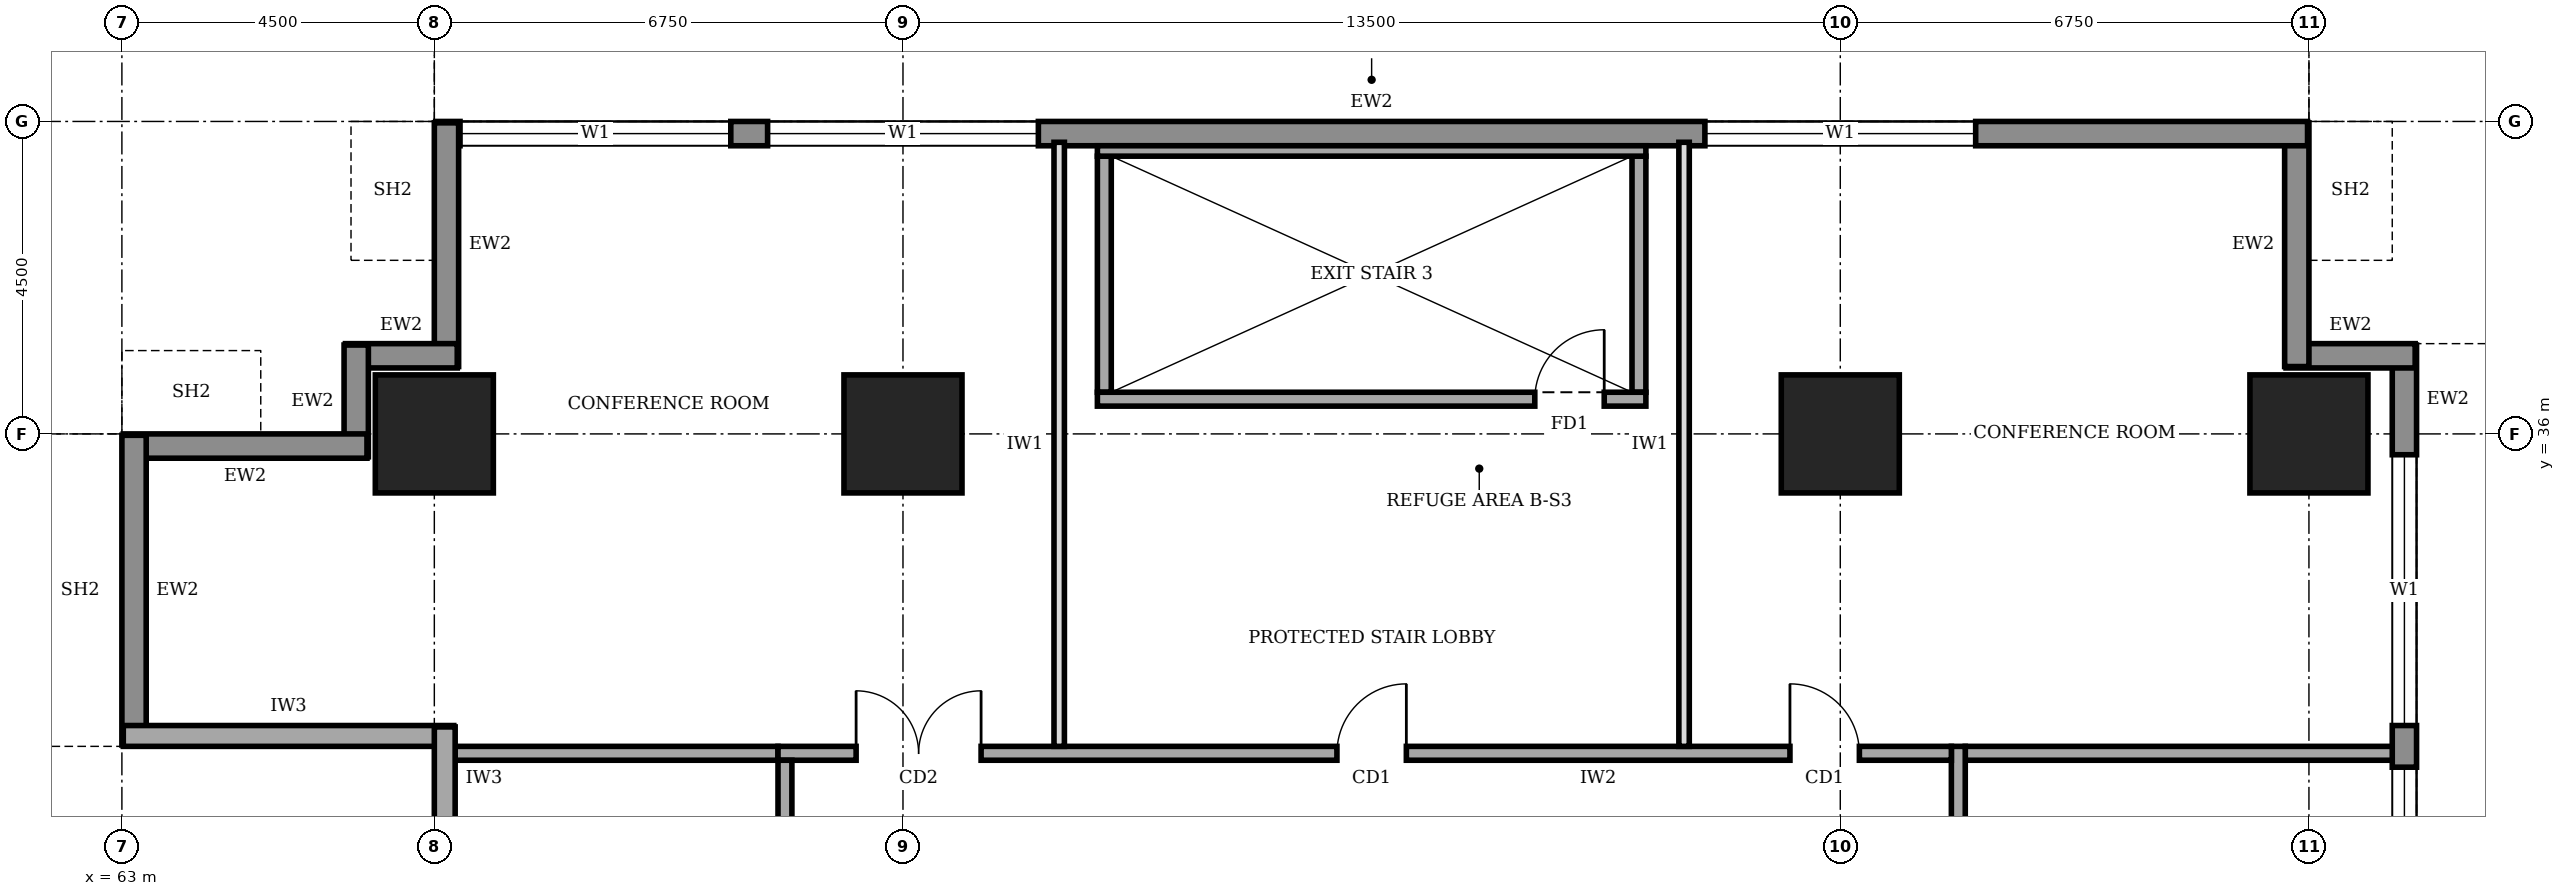
"""IFC4 building model, lengths in metres.
Left out: names, types, materials, properties, quantities, classifications, styles, units other than length and angle.
Written with IfcOpenShell. Run it as: python <this file> out.ifc"""

import sys

from ifc_helpers import new_model, si_unit, direction, frame, frame_2d, origin, origin_2d, place, context, subcontext, project, spatial, rectangle, extrude, element, fill, save


model = new_model("IFC4")
c1 = context("Model", 3, precision=1e-05, world=origin(), true_north=direction((0.0, 1.0)))
c2 = subcontext(c1, "Body", "Model", "MODEL_VIEW")
j1 = project(units=[si_unit("LENGTHUNIT", "METRE"), si_unit("PLANEANGLEUNIT", "RADIAN")], contexts=[c1])
p1 = place(None, origin())
s1 = spatial("IfcSite", under=j1, at=p1, CompositionType="ELEMENT")
p2 = place(p1, origin())
s2 = spatial("IfcBuilding", under=s1, at=p2, CompositionType="ELEMENT")
p3 = place(p2, frame((0.0, 0.0, 133.0)))
s3 = spatial("IfcBuildingStorey", under=s2, at=p3, CompositionType="ELEMENT", Elevation=133.0)
for number, where, z_axis, x_axis in (
    (1, (67.5, 36.0, 0.0), (0.0, 0.0, 1.0), (1.0, 0.0, 0.0)),
    (2, (74.25, 36.0, 0.0), (0.0, 0.0, 1.0), (1.0, 0.0, 0.0)),
    (3, (87.75, 36.0, 0.0), (0.0, 0.0, 1.0), (1.0, 0.0, 0.0)),
    (4, (94.5, 36.0, 0.0), (0.0, 0.0, 1.0), (1.0, 0.0, 0.0)),
):
    element("IfcColumn", number, at=place(p3, frame(where, z_axis=z_axis, x_axis=x_axis)), inside=s3, PredefinedType="COLUMN", context=c2, shape_type="SweptSolid", body=[
        extrude(rectangle(XDim=1.7, YDim=1.7, at=origin_2d()), origin(), (0.0, 0.0, 1.0), 4.0),
    ])
p4 = place(p3, frame((95.875, 3.32, 0.0), z_axis=(0.0, 0.0, 1.0), x_axis=(0.0, 1.0, 0.0)))
e5 = element("IfcWall", 5, at=p4, inside=s3, PredefinedType="STANDARD", context=c2, shape_type="SweptSolid", body=[
    extrude(rectangle(XDim=33.96, YDim=0.35, at=frame_2d((16.98, 0.0))), origin(), (0.0, 0.0, 1.0), 3.75),
])
p5 = place(p4, frame((1.48, 0.0, 0.9)))
e6 = element("IfcOpeningElement", 6, at=p5, cuts=e5, PredefinedType="OPENING", context=c2, shape_type="SweptSolid", body=[
    extrude(rectangle(XDim=3.9, YDim=2.2, at=frame_2d((1.95, 1.1))), frame((0.0, 0.185, 0.0), z_axis=(0.0, -1.0, 0.0), x_axis=(1.0, 0.0, 0.0)), (0.0, 0.0, 1.0), 0.37),
])
p6 = place(p4, frame((5.98, 0.0, 0.9)))
e7 = element("IfcOpeningElement", 7, at=p6, cuts=e5, PredefinedType="OPENING", context=c2, shape_type="SweptSolid", body=[
    extrude(rectangle(XDim=3.9, YDim=2.2, at=frame_2d((1.95, 1.1))), frame((0.0, 0.185, 0.0), z_axis=(0.0, -1.0, 0.0), x_axis=(1.0, 0.0, 0.0)), (0.0, 0.0, 1.0), 0.37),
])
p7 = place(p4, frame((10.48, 0.0, 0.9)))
e8 = element("IfcOpeningElement", 8, at=p7, cuts=e5, PredefinedType="OPENING", context=c2, shape_type="SweptSolid", body=[
    extrude(rectangle(XDim=3.9, YDim=2.2, at=frame_2d((1.95, 1.1))), frame((0.0, 0.185, 0.0), z_axis=(0.0, -1.0, 0.0), x_axis=(1.0, 0.0, 0.0)), (0.0, 0.0, 1.0), 0.37),
])
p8 = place(p4, frame((14.98, 0.0, 0.9)))
e9 = element("IfcOpeningElement", 9, at=p8, cuts=e5, PredefinedType="OPENING", context=c2, shape_type="SweptSolid", body=[
    extrude(rectangle(XDim=3.9, YDim=2.2, at=frame_2d((1.95, 1.1))), frame((0.0, 0.185, 0.0), z_axis=(0.0, -1.0, 0.0), x_axis=(1.0, 0.0, 0.0)), (0.0, 0.0, 1.0), 0.37),
])
p9 = place(p4, frame((19.48, 0.0, 0.9)))
e10 = element("IfcOpeningElement", 10, at=p9, cuts=e5, PredefinedType="OPENING", context=c2, shape_type="SweptSolid", body=[
    extrude(rectangle(XDim=3.9, YDim=2.2, at=frame_2d((1.95, 1.1))), frame((0.0, 0.185, 0.0), z_axis=(0.0, -1.0, 0.0), x_axis=(1.0, 0.0, 0.0)), (0.0, 0.0, 1.0), 0.37),
])
p10 = place(p4, frame((23.98, 0.0, 0.9)))
e11 = element("IfcOpeningElement", 11, at=p10, cuts=e5, PredefinedType="OPENING", context=c2, shape_type="SweptSolid", body=[
    extrude(rectangle(XDim=3.9, YDim=2.2, at=frame_2d((1.95, 1.1))), frame((0.0, 0.185, 0.0), z_axis=(0.0, -1.0, 0.0), x_axis=(1.0, 0.0, 0.0)), (0.0, 0.0, 1.0), 0.37),
])
p11 = place(p4, frame((28.48, 0.0, 0.9)))
e12 = element("IfcOpeningElement", 12, at=p11, cuts=e5, PredefinedType="OPENING", context=c2, shape_type="SweptSolid", body=[
    extrude(rectangle(XDim=3.9, YDim=2.2, at=frame_2d((1.95, 1.1))), frame((0.0, 0.185, 0.0), z_axis=(0.0, -1.0, 0.0), x_axis=(1.0, 0.0, 0.0)), (0.0, 0.0, 1.0), 0.37),
])
p12 = place(p3, frame((96.03, 37.125, 0.0), z_axis=(0.0, 0.0, 1.0), x_axis=(-1.0, 0.0, 0.0)))
e13 = element("IfcWall", 13, at=p12, inside=s3, PredefinedType="STANDARD", context=c2, shape_type="SweptSolid", body=[
    extrude(rectangle(XDim=1.86, YDim=0.35, at=frame_2d((0.93, 0.0))), origin(), (0.0, 0.0, 1.0), 3.75),
])
p13 = place(p3, frame((94.325, 36.97, 0.0), z_axis=(0.0, 0.0, 1.0), x_axis=(0.0, 1.0, 0.0)))
e14 = element("IfcWall", 14, at=p13, inside=s3, PredefinedType="STANDARD", context=c2, shape_type="SweptSolid", body=[
    extrude(rectangle(XDim=3.51, YDim=0.35, at=frame_2d((1.755, 0.0))), origin(), (0.0, 0.0, 1.0), 2.85),
])
p14 = place(p3, frame((94.48, 40.325, 0.0), z_axis=(0.0, 0.0, 1.0), x_axis=(-1.0, 0.0, 0.0)))
e15 = element("IfcWall", 15, at=p14, inside=s3, PredefinedType="STANDARD", context=c2, shape_type="SweptSolid", body=[
    extrude(rectangle(XDim=26.96, YDim=0.35, at=frame_2d((13.48, 0.0))), origin(), (0.0, 0.0, 1.0), 3.75),
])
p15 = place(p14, frame((22.71, 0.0, 0.9)))
e16 = element("IfcOpeningElement", 16, at=p15, cuts=e15, PredefinedType="OPENING", context=c2, shape_type="SweptSolid", body=[
    extrude(rectangle(XDim=3.9, YDim=2.2, at=frame_2d((1.95, 1.1))), frame((0.0, 0.185, 0.0), z_axis=(0.0, -1.0, 0.0), x_axis=(1.0, 0.0, 0.0)), (0.0, 0.0, 1.0), 0.37),
])
p16 = place(p14, frame((18.28, 0.0, 0.9)))
e17 = element("IfcOpeningElement", 17, at=p16, cuts=e15, PredefinedType="OPENING", context=c2, shape_type="SweptSolid", body=[
    extrude(rectangle(XDim=3.9, YDim=2.2, at=frame_2d((1.95, 1.1))), frame((0.0, 0.185, 0.0), z_axis=(0.0, -1.0, 0.0), x_axis=(1.0, 0.0, 0.0)), (0.0, 0.0, 1.0), 0.37),
])
p17 = place(p14, frame((4.78, 0.0, 0.9)))
e18 = element("IfcOpeningElement", 18, at=p17, cuts=e15, PredefinedType="OPENING", context=c2, shape_type="SweptSolid", body=[
    extrude(rectangle(XDim=3.9, YDim=2.2, at=frame_2d((1.95, 1.1))), frame((0.0, 0.185, 0.0), z_axis=(0.0, -1.0, 0.0), x_axis=(1.0, 0.0, 0.0)), (0.0, 0.0, 1.0), 0.37),
])
p18 = place(p3, frame((67.675, 40.48, 0.0), z_axis=(0.0, 0.0, 1.0), x_axis=(0.0, -1.0, 0.0)))
e19 = element("IfcWall", 19, at=p18, inside=s3, PredefinedType="STANDARD", context=c2, shape_type="SweptSolid", body=[
    extrude(rectangle(XDim=3.51, YDim=0.35, at=frame_2d((1.755, 0.0))), origin(), (0.0, 0.0, 1.0), 2.85),
])
for number, where, z_axis, x_axis in (
    (20, (67.83, 37.125, 0.0), (0.0, 0.0, 1.0), (-1.0, 0.0, 0.0)),
    (21, (66.375, 37.28, 0.0), (0.0, 0.0, 1.0), (0.0, -1.0, 0.0)),
):
    element("IfcWall", number, at=place(p3, frame(where, z_axis=z_axis, x_axis=x_axis)), inside=s3, PredefinedType="STANDARD", context=c2, shape_type="SweptSolid", body=[
        extrude(rectangle(XDim=1.61, YDim=0.35, at=frame_2d((0.805, 0.0))), origin(), (0.0, 0.0, 1.0), 3.75),
    ])
p19 = place(p3, frame((66.53, 35.825, 0.0), z_axis=(0.0, 0.0, 1.0), x_axis=(-1.0, 0.0, 0.0)))
e22 = element("IfcWall", 22, at=p19, inside=s3, PredefinedType="STANDARD", context=c2, shape_type="SweptSolid", body=[
    extrude(rectangle(XDim=3.51, YDim=0.35, at=frame_2d((1.755, 0.0))), origin(), (0.0, 0.0, 1.0), 2.85),
])
p20 = place(p3, frame((63.175, 35.98, 0.0), z_axis=(0.0, 0.0, 1.0), x_axis=(0.0, -1.0, 0.0)))
e23 = element("IfcWall", 23, at=p20, inside=s3, PredefinedType="STANDARD", context=c2, shape_type="SweptSolid", body=[
    extrude(rectangle(XDim=4.46, YDim=0.35, at=frame_2d((2.23, 0.0))), origin(), (0.0, 0.0, 1.0), 3.75),
])
p21 = place(p3, frame((63.02, 31.65, 0.0), z_axis=(0.0, 0.0, 1.0), x_axis=(1.0, 0.0, 0.0)))
e24 = element("IfcWall", 24, at=p21, inside=s3, PredefinedType="SOLIDWALL", context=c2, shape_type="SweptSolid", body=[
    extrude(rectangle(XDim=4.76, YDim=0.3, at=frame_2d((2.38, 0.0))), origin(), (0.0, 0.0, 1.0), 3.75),
])
p22 = place(p3, frame((67.65, 31.78, 0.0), z_axis=(0.0, 0.0, 1.0), x_axis=(0.0, -1.0, 0.0)))
e25 = element("IfcWall", 25, at=p22, inside=s3, PredefinedType="SOLIDWALL", context=c2, shape_type="SweptSolid", body=[
    extrude(rectangle(XDim=1.48, YDim=0.3, at=frame_2d((0.74, 0.0))), origin(), (0.0, 0.0, 1.0), 2.65),
])
p23 = place(p3, frame((89.45, 9.2, 0.0), z_axis=(0.0, 0.0, 1.0), x_axis=(0.0, 1.0, 0.0)))
e26 = element("IfcWall", 26, at=p23, inside=s3, PredefinedType="SOLIDWALL", context=c2, shape_type="SweptSolid", body=[
    extrude(rectangle(XDim=22.3, YDim=0.2, at=frame_2d((11.15, 0.0))), origin(), (0.0, 0.0, 1.0), 3.75),
])
p24 = place(p23, frame((1.625, 0.0, 0.0)))
e27 = element("IfcOpeningElement", 27, at=p24, cuts=e26, PredefinedType="OPENING", context=c2, shape_type="SweptSolid", body=[
    extrude(rectangle(XDim=1.0, YDim=2.1, at=frame_2d((0.5, 1.05))), frame((0.0, 0.11, 0.0), z_axis=(0.0, -1.0, 0.0), x_axis=(1.0, 0.0, 0.0)), (0.0, 0.0, 1.0), 0.22),
])
p25 = place(p23, frame((5.2, 0.0, 0.0)))
e28 = element("IfcOpeningElement", 28, at=p25, cuts=e26, PredefinedType="OPENING", context=c2, shape_type="SweptSolid", body=[
    extrude(rectangle(XDim=0.9, YDim=2.1, at=frame_2d((0.45, 1.05))), frame((0.0, 0.11, 0.0), z_axis=(0.0, -1.0, 0.0), x_axis=(1.0, 0.0, 0.0)), (0.0, 0.0, 1.0), 0.22),
])
p26 = place(p23, frame((8.325, 0.0, 0.0)))
e29 = element("IfcOpeningElement", 29, at=p26, cuts=e26, PredefinedType="OPENING", context=c2, shape_type="SweptSolid", body=[
    extrude(rectangle(XDim=0.9, YDim=2.1, at=frame_2d((0.45, 1.05))), frame((0.0, 0.11, 0.0), z_axis=(0.0, -1.0, 0.0), x_axis=(1.0, 0.0, 0.0)), (0.0, 0.0, 1.0), 0.22),
])
p27 = place(p23, frame((13.725, 0.0, 0.0)))
e30 = element("IfcOpeningElement", 30, at=p27, cuts=e26, PredefinedType="OPENING", context=c2, shape_type="SweptSolid", body=[
    extrude(rectangle(XDim=0.9, YDim=2.1, at=frame_2d((0.45, 1.05))), frame((0.0, 0.11, 0.0), z_axis=(0.0, -1.0, 0.0), x_axis=(1.0, 0.0, 0.0)), (0.0, 0.0, 1.0), 0.22),
])
p28 = place(p23, frame((16.15, 0.0, 0.0)))
e31 = element("IfcOpeningElement", 31, at=p28, cuts=e26, PredefinedType="OPENING", context=c2, shape_type="SweptSolid", body=[
    extrude(rectangle(XDim=1.0, YDim=2.1, at=frame_2d((0.5, 1.05))), frame((0.0, 0.11, 0.0), z_axis=(0.0, -1.0, 0.0), x_axis=(1.0, 0.0, 0.0)), (0.0, 0.0, 1.0), 0.22),
])
p29 = place(p23, frame((11.2, 0.0, 0.0)))
e32 = element("IfcOpeningElement", 32, at=p29, cuts=e26, PredefinedType="OPENING", context=c2, shape_type="SweptSolid", body=[
    extrude(rectangle(XDim=1.0, YDim=2.1, at=frame_2d((0.5, 1.05))), frame((0.0, 0.11, 0.0), z_axis=(0.0, -1.0, 0.0), x_axis=(1.0, 0.0, 0.0)), (0.0, 0.0, 1.0), 0.22),
])
p30 = place(p23, frame((19.475, 0.0, 0.0)))
e33 = element("IfcOpeningElement", 33, at=p30, cuts=e26, PredefinedType="OPENING", context=c2, shape_type="SweptSolid", body=[
    extrude(rectangle(XDim=1.0, YDim=2.1, at=frame_2d((0.5, 1.05))), frame((0.0, 0.11, 0.0), z_axis=(0.0, -1.0, 0.0), x_axis=(1.0, 0.0, 0.0)), (0.0, 0.0, 1.0), 0.22),
])
p31 = place(p3, frame((89.35, 31.4, 0.0), z_axis=(0.0, 0.0, 1.0), x_axis=(-1.0, 0.0, 0.0)))
e34 = element("IfcWall", 34, at=p31, inside=s3, PredefinedType="SOLIDWALL", context=c2, shape_type="SweptSolid", body=[
    extrude(rectangle(XDim=16.9, YDim=0.2, at=frame_2d((8.45, 0.0))), origin(), (0.0, 0.0, 1.0), 3.75),
])
p32 = place(p31, frame((13.975, 0.0, 0.0)))
e35 = element("IfcOpeningElement", 35, at=p32, cuts=e34, PredefinedType="OPENING", context=c2, shape_type="SweptSolid", body=[
    extrude(rectangle(XDim=1.8, YDim=2.1, at=frame_2d((0.9, 1.05))), frame((0.0, 0.11, 0.0), z_axis=(0.0, -1.0, 0.0), x_axis=(1.0, 0.0, 0.0)), (0.0, 0.0, 1.0), 0.22),
])
p33 = place(p31, frame((7.85, 0.0, 0.0)))
e36 = element("IfcOpeningElement", 36, at=p33, cuts=e34, PredefinedType="OPENING", context=c2, shape_type="SweptSolid", body=[
    extrude(rectangle(XDim=1.0, YDim=2.1, at=frame_2d((0.5, 1.05))), frame((0.0, 0.11, 0.0), z_axis=(0.0, -1.0, 0.0), x_axis=(1.0, 0.0, 0.0)), (0.0, 0.0, 1.0), 0.22),
])
p34 = place(p31, frame((1.325, 0.0, 0.0)))
e37 = element("IfcOpeningElement", 37, at=p34, cuts=e34, PredefinedType="OPENING", context=c2, shape_type="SweptSolid", body=[
    extrude(rectangle(XDim=1.0, YDim=2.1, at=frame_2d((0.5, 1.05))), frame((0.0, 0.11, 0.0), z_axis=(0.0, -1.0, 0.0), x_axis=(1.0, 0.0, 0.0)), (0.0, 0.0, 1.0), 0.22),
])
p35 = place(p3, frame((72.55, 31.3, 0.0), z_axis=(0.0, 0.0, 1.0), x_axis=(0.0, -1.0, 0.0)))
e38 = element("IfcWall", 38, at=p35, inside=s3, PredefinedType="SOLIDWALL", context=c2, shape_type="SweptSolid", body=[
    extrude(rectangle(XDim=22.3, YDim=0.2, at=frame_2d((11.15, 0.0))), origin(), (0.0, 0.0, 1.0), 3.75),
])
p36 = place(p35, frame((10.15, 0.0, 0.0)))
e39 = element("IfcOpeningElement", 39, at=p36, cuts=e38, PredefinedType="OPENING", context=c2, shape_type="SweptSolid", body=[
    extrude(rectangle(XDim=1.8, YDim=2.1, at=frame_2d((0.9, 1.05))), frame((0.0, 0.11, 0.0), z_axis=(0.0, -1.0, 0.0), x_axis=(1.0, 0.0, 0.0)), (0.0, 0.0, 1.0), 0.22),
])
p37 = place(p3, frame((67.8, 31.4, 0.0), z_axis=(0.0, 0.0, 1.0), x_axis=(1.0, 0.0, 0.0)))
e40 = element("IfcWall", 40, at=p37, inside=s3, PredefinedType="SOLIDWALL", context=c2, shape_type="SweptSolid", body=[
    extrude(rectangle(XDim=4.65, YDim=0.2, at=frame_2d((2.325, 0.0))), origin(), (0.0, 0.0, 1.0), 3.75),
])
p38 = place(p3, frame((89.55, 31.4, 0.0), z_axis=(0.0, 0.0, 1.0), x_axis=(1.0, 0.0, 0.0)))
e41 = element("IfcWall", 41, at=p38, inside=s3, PredefinedType="SOLIDWALL", context=c2, shape_type="SweptSolid", body=[
    extrude(rectangle(XDim=6.2, YDim=0.2, at=frame_2d((3.1, 0.0))), origin(), (0.0, 0.0, 1.0), 3.75),
])
for number, where, z_axis, x_axis in (
    (42, (76.5, 31.5, 0.0), (0.0, 0.0, 1.0), (0.0, 1.0, 0.0)),
    (43, (85.5, 31.5, 0.0), (0.0, 0.0, 1.0), (0.0, 1.0, 0.0)),
):
    element("IfcWall", number, at=place(p3, frame(where, z_axis=z_axis, x_axis=x_axis)), inside=s3, PredefinedType="PARTITIONING", context=c2, shape_type="SweptSolid", body=[
        extrude(rectangle(XDim=8.7, YDim=0.15, at=frame_2d((4.35, 0.0))), origin(), (0.0, 0.0, 1.0), 3.75),
    ])
p39 = place(p3, frame((77.05, 36.5, 0.0), z_axis=(0.0, 0.0, 1.0), x_axis=(1.0, 0.0, 0.0)))
e44 = element("IfcWall", 44, at=p39, inside=s3, PredefinedType="SOLIDWALL", context=c2, shape_type="SweptSolid", body=[
    extrude(rectangle(XDim=7.9, YDim=0.2, at=frame_2d((3.95, 0.0))), origin(), (0.0, 0.0, 1.0), 3.75),
])
p40 = place(p39, frame((6.3, 0.0, 0.0)))
e45 = element("IfcOpeningElement", 45, at=p40, cuts=e44, PredefinedType="OPENING", context=c2, shape_type="SweptSolid", body=[
    extrude(rectangle(XDim=1.0, YDim=2.1, at=frame_2d((0.5, 1.05))), frame((0.0, 0.11, 0.0), z_axis=(0.0, -1.0, 0.0), x_axis=(1.0, 0.0, 0.0)), (0.0, 0.0, 1.0), 0.22),
])
p41 = place(p3, frame((77.05, 40.075, 0.0), z_axis=(0.0, 0.0, 1.0), x_axis=(1.0, 0.0, 0.0)))
e46 = element("IfcWall", 46, at=p41, inside=s3, PredefinedType="SOLIDWALL", context=c2, shape_type="SweptSolid", body=[
    extrude(rectangle(XDim=7.9, YDim=0.15, at=frame_2d((3.95, 0.0))), origin(), (0.0, 0.0, 1.0), 3.75),
])
for number, where, z_axis, x_axis in (
    (47, (77.15, 36.6, 0.0), (0.0, 0.0, 1.0), (0.0, 1.0, 0.0)),
    (48, (84.85, 36.6, 0.0), (0.0, 0.0, 1.0), (0.0, 1.0, 0.0)),
):
    element("IfcWall", number, at=place(p3, frame(where, z_axis=z_axis, x_axis=x_axis)), inside=s3, PredefinedType="SOLIDWALL", context=c2, shape_type="SweptSolid", body=[
        extrude(rectangle(XDim=3.4, YDim=0.2, at=frame_2d((1.7, 0.0))), origin(), (0.0, 0.0, 1.0), 3.75),
    ])
p42 = place(p10, origin())
e49 = element("IfcWindow", 49, at=p42, inside=s3, PartitioningType="SINGLE_PANEL", PredefinedType="WINDOW", context=c2, shape_type="SweptSolid", body=[
    extrude(rectangle(XDim=3.9, YDim=2.2, at=frame_2d((1.95, 1.1))), frame((0.0, 0.03, 0.0), z_axis=(0.0, -1.0, 0.0), x_axis=(1.0, 0.0, 0.0)), (0.0, 0.0, 1.0), 0.06),
])
fill(e11, e49)
p43 = place(p11, origin())
e50 = element("IfcWindow", 50, at=p43, inside=s3, PartitioningType="SINGLE_PANEL", PredefinedType="WINDOW", context=c2, shape_type="SweptSolid", body=[
    extrude(rectangle(XDim=3.9, YDim=2.2, at=frame_2d((1.95, 1.1))), frame((0.0, 0.03, 0.0), z_axis=(0.0, -1.0, 0.0), x_axis=(1.0, 0.0, 0.0)), (0.0, 0.0, 1.0), 0.06),
])
fill(e12, e50)
p44 = place(p15, origin())
e51 = element("IfcWindow", 51, at=p44, inside=s3, PartitioningType="SINGLE_PANEL", PredefinedType="WINDOW", context=c2, shape_type="SweptSolid", body=[
    extrude(rectangle(XDim=3.9, YDim=2.2, at=frame_2d((1.95, 1.1))), frame((0.0, 0.03, 0.0), z_axis=(0.0, -1.0, 0.0), x_axis=(1.0, 0.0, 0.0)), (0.0, 0.0, 1.0), 0.06),
])
fill(e16, e51)
p45 = place(p16, origin())
e52 = element("IfcWindow", 52, at=p45, inside=s3, PartitioningType="SINGLE_PANEL", PredefinedType="WINDOW", context=c2, shape_type="SweptSolid", body=[
    extrude(rectangle(XDim=3.9, YDim=2.2, at=frame_2d((1.95, 1.1))), frame((0.0, 0.03, 0.0), z_axis=(0.0, -1.0, 0.0), x_axis=(1.0, 0.0, 0.0)), (0.0, 0.0, 1.0), 0.06),
])
fill(e17, e52)
p46 = place(p17, origin())
e53 = element("IfcWindow", 53, at=p46, inside=s3, PartitioningType="SINGLE_PANEL", PredefinedType="WINDOW", context=c2, shape_type="SweptSolid", body=[
    extrude(rectangle(XDim=3.9, YDim=2.2, at=frame_2d((1.95, 1.1))), frame((0.0, 0.03, 0.0), z_axis=(0.0, -1.0, 0.0), x_axis=(1.0, 0.0, 0.0)), (0.0, 0.0, 1.0), 0.06),
])
fill(e18, e53)
p47 = place(p32, frame((1.8, 0.0, 0.0), z_axis=(0.0, 0.0, 1.0), x_axis=(-1.0, 0.0, 0.0)))
e54 = element("IfcDoor", 54, at=p47, inside=s3, OperationType="DOUBLE_DOOR_SINGLE_SWING", PredefinedType="DOOR", context=c2, shape_type="SweptSolid", body=[
    extrude(rectangle(XDim=1.8, YDim=2.1, at=frame_2d((0.9, 1.05))), frame((0.0, 0.025, 0.0), z_axis=(0.0, -1.0, 0.0), x_axis=(1.0, 0.0, 0.0)), (0.0, 0.0, 1.0), 0.05),
])
fill(e35, e54)
p48 = place(p33, frame((1.0, 0.0, 0.0), z_axis=(0.0, 0.0, 1.0), x_axis=(-1.0, 0.0, 0.0)))
e55 = element("IfcDoor", 55, at=p48, inside=s3, OperationType="SINGLE_SWING_RIGHT", PredefinedType="DOOR", context=c2, shape_type="SweptSolid", body=[
    extrude(rectangle(XDim=1.0, YDim=2.1, at=frame_2d((0.5, 1.05))), frame((0.0, 0.025, 0.0), z_axis=(0.0, -1.0, 0.0), x_axis=(1.0, 0.0, 0.0)), (0.0, 0.0, 1.0), 0.05),
])
fill(e36, e55)
p49 = place(p34, frame((1.0, 0.0, 0.0), z_axis=(0.0, 0.0, 1.0), x_axis=(-1.0, 0.0, 0.0)))
e56 = element("IfcDoor", 56, at=p49, inside=s3, OperationType="SINGLE_SWING_LEFT", PredefinedType="DOOR", context=c2, shape_type="SweptSolid", body=[
    extrude(rectangle(XDim=1.0, YDim=2.1, at=frame_2d((0.5, 1.05))), frame((0.0, 0.025, 0.0), z_axis=(0.0, -1.0, 0.0), x_axis=(1.0, 0.0, 0.0)), (0.0, 0.0, 1.0), 0.05),
])
fill(e37, e56)
p50 = place(p40, origin())
e57 = element("IfcDoor", 57, at=p50, inside=s3, OperationType="SINGLE_SWING_RIGHT", PredefinedType="DOOR", context=c2, shape_type="SweptSolid", body=[
    extrude(rectangle(XDim=1.0, YDim=2.1, at=frame_2d((0.5, 1.05))), frame((0.0, 0.025, 0.0), z_axis=(0.0, -1.0, 0.0), x_axis=(1.0, 0.0, 0.0)), (0.0, 0.0, 1.0), 0.05),
])
fill(e45, e57)
save(model, sys.argv[1])
